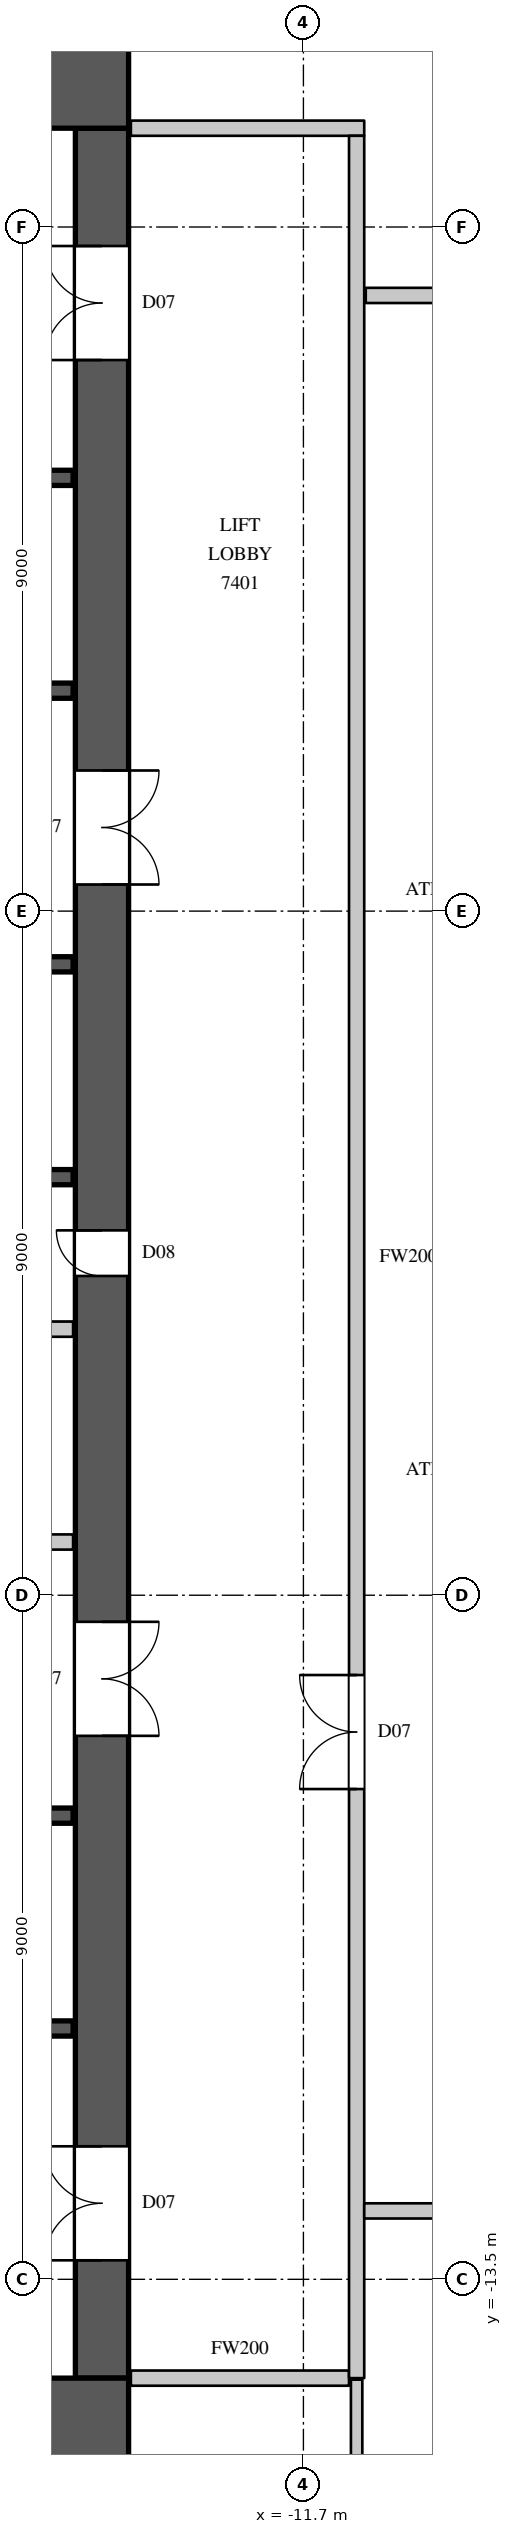
"""IFC4 building model, lengths in metres.
Left out: names, types, materials, properties, quantities, classifications, styles, units other than length and angle.
Written with IfcOpenShell. Run it as: python <this file> out.ifc"""

import sys

from ifc_helpers import new_model, si_unit, direction, frame, frame_2d, origin, place, context, subcontext, project, spatial, rectangle, extrude, element, fill, save


model = new_model("IFC4")
c1 = context("Model", 3, precision=1e-05, world=origin(), true_north=direction((0.0, 1.0)))
c2 = subcontext(c1, "Body", "Model", "MODEL_VIEW")
j1 = project(units=[si_unit("LENGTHUNIT", "METRE"), si_unit("PLANEANGLEUNIT", "RADIAN")], contexts=[c1])
p1 = place(None, origin())
s1 = spatial("IfcSite", under=j1, at=p1, CompositionType="ELEMENT")
p2 = place(p1, origin())
s2 = spatial("IfcBuilding", under=s1, at=p2, CompositionType="ELEMENT")
p3 = place(p2, frame((0.0, 0.0, 325.4)))
s3 = spatial("IfcBuildingStorey", under=s2, at=p3, CompositionType="ELEMENT", Elevation=325.4)
for number, where, z_axis, x_axis in (
    (1, (-30.0, 15.4, 0.0), (0.0, 0.0, 1.0), (1.0, 0.0, 0.0)),
    (2, (-30.0, -15.4, 0.0), (0.0, 0.0, 1.0), (1.0, 0.0, 0.0)),
):
    element("IfcWall", number, at=place(p3, frame(where, z_axis=z_axis, x_axis=x_axis)), inside=s3, PredefinedType="SHEAR", context=c2, shape_type="SweptSolid", body=[
        extrude(rectangle(XDim=16.0, YDim=1.2, at=frame_2d((8.0, 0.0))), origin(), (0.0, 0.0, 1.0), 4.1),
    ])
p4 = place(p3, frame((-14.35, -14.8, 0.0), z_axis=(0.0, 0.0, 1.0), x_axis=(0.0, 1.0, 0.0)))
e3 = element("IfcWall", 3, at=p4, inside=s3, PredefinedType="SHEAR", context=c2, shape_type="SweptSolid", body=[
    extrude(rectangle(XDim=29.6, YDim=0.7, at=frame_2d((14.8, 0.0))), origin(), (0.0, 0.0, 1.0), 4.1),
])
p5 = place(p4, frame((1.55, 0.0, 0.0)))
e4 = element("IfcOpeningElement", 4, at=p5, cuts=e3, PredefinedType="OPENING", context=c2, shape_type="SweptSolid", body=[
    extrude(rectangle(XDim=1.5, YDim=2.4, at=frame_2d((0.75, 1.2))), frame((0.0, 0.36, 0.0), z_axis=(0.0, -1.0, 0.0), x_axis=(1.0, 0.0, 0.0)), (0.0, 0.0, 1.0), 0.72),
])
p6 = place(p4, frame((26.55, 0.0, 0.0)))
e5 = element("IfcOpeningElement", 5, at=p6, cuts=e3, PredefinedType="OPENING", context=c2, shape_type="SweptSolid", body=[
    extrude(rectangle(XDim=1.5, YDim=2.4, at=frame_2d((0.75, 1.2))), frame((0.0, 0.36, 0.0), z_axis=(0.0, -1.0, 0.0), x_axis=(1.0, 0.0, 0.0)), (0.0, 0.0, 1.0), 0.72),
])
p7 = place(p4, frame((8.45, 0.0, 0.0)))
e6 = element("IfcOpeningElement", 6, at=p7, cuts=e3, PredefinedType="OPENING", context=c2, shape_type="SweptSolid", body=[
    extrude(rectangle(XDim=1.5, YDim=2.4, at=frame_2d((0.75, 1.2))), frame((0.0, 0.36, 0.0), z_axis=(0.0, -1.0, 0.0), x_axis=(1.0, 0.0, 0.0)), (0.0, 0.0, 1.0), 0.72),
])
p8 = place(p4, frame((19.65, 0.0, 0.0)))
e7 = element("IfcOpeningElement", 7, at=p8, cuts=e3, PredefinedType="OPENING", context=c2, shape_type="SweptSolid", body=[
    extrude(rectangle(XDim=1.5, YDim=2.4, at=frame_2d((0.75, 1.2))), frame((0.0, 0.36, 0.0), z_axis=(0.0, -1.0, 0.0), x_axis=(1.0, 0.0, 0.0)), (0.0, 0.0, 1.0), 0.72),
])
p9 = place(p4, frame((14.5, 0.0, 0.0)))
e8 = element("IfcOpeningElement", 8, at=p9, cuts=e3, PredefinedType="OPENING", context=c2, shape_type="SweptSolid", body=[
    extrude(rectangle(XDim=0.6, YDim=2.0, at=frame_2d((0.3, 1.0))), frame((0.0, 0.36, 0.0), z_axis=(0.0, -1.0, 0.0), x_axis=(1.0, 0.0, 0.0)), (0.0, 0.0, 1.0), 0.72),
])
p10 = place(p3, frame((-17.78, -3.8, 0.0), z_axis=(0.0, 0.0, 1.0), x_axis=(1.0, 0.0, 0.0)))
e9 = element("IfcWall", 9, at=p10, inside=s3, PredefinedType="PARTITIONING", context=c2, shape_type="SweptSolid", body=[
    extrude(rectangle(XDim=3.05, YDim=0.2, at=frame_2d((1.525, 0.0))), origin(), (0.0, 0.0, 1.0), 3.8),
])
p11 = place(p10, frame((1.05, 0.0, 0.0)))
e10 = element("IfcOpeningElement", 10, at=p11, cuts=e9, PredefinedType="OPENING", context=c2, shape_type="SweptSolid", body=[
    extrude(rectangle(XDim=0.9, YDim=2.2, at=frame_2d((0.45, 1.1))), frame((0.0, 0.11, 0.0), z_axis=(0.0, -1.0, 0.0), x_axis=(1.0, 0.0, 0.0)), (0.0, 0.0, 1.0), 0.22),
])
p12 = place(p3, frame((-13.97, -14.8, 0.0), z_axis=(0.0, 0.0, 1.0), x_axis=(1.0, 0.0, 0.0)))
e11 = element("IfcWall", 11, at=p12, inside=s3, PredefinedType="PARTITIONING", context=c2, shape_type="SweptSolid", body=[
    extrude(rectangle(XDim=2.87, YDim=0.2, at=frame_2d((1.435, 0.0))), origin(), (0.0, 0.0, 1.0), 3.8),
])
p13 = place(p3, frame((-13.97, 14.8, 0.0), z_axis=(0.0, 0.0, 1.0), x_axis=(1.0, 0.0, 0.0)))
e12 = element("IfcWall", 12, at=p13, inside=s3, PredefinedType="PARTITIONING", context=c2, shape_type="SweptSolid", body=[
    extrude(rectangle(XDim=3.07, YDim=0.2, at=frame_2d((1.535, 0.0))), origin(), (0.0, 0.0, 1.0), 3.8),
])
p14 = place(p3, frame((-11.0, -14.8, 0.0), z_axis=(0.0, 0.0, 1.0), x_axis=(0.0, 1.0, 0.0)))
e13 = element("IfcWall", 13, at=p14, inside=s3, PredefinedType="PARTITIONING", context=c2, shape_type="SweptSolid", body=[
    extrude(rectangle(XDim=29.5, YDim=0.2, at=frame_2d((14.75, 0.0))), origin(), (0.0, 0.0, 1.0), 3.8),
])
p15 = place(p14, frame((7.75, 0.0, 0.0)))
e14 = element("IfcOpeningElement", 14, at=p15, cuts=e13, PredefinedType="OPENING", context=c2, shape_type="SweptSolid", body=[
    extrude(rectangle(XDim=1.5, YDim=2.4, at=frame_2d((0.75, 1.2))), frame((0.0, 0.11, 0.0), z_axis=(0.0, -1.0, 0.0), x_axis=(1.0, 0.0, 0.0)), (0.0, 0.0, 1.0), 0.22),
])
p16 = place(p3, frame((-10.9, -12.6, 0.0), z_axis=(0.0, 0.0, 1.0), x_axis=(1.0, 0.0, 0.0)))
e15 = element("IfcWall", 15, at=p16, inside=s3, PredefinedType="PARTITIONING", context=c2, shape_type="SweptSolid", body=[
    extrude(rectangle(XDim=22.6, YDim=0.2, at=frame_2d((11.3, 0.0))), origin(), (0.0, 0.0, 1.0), 3.8),
])
p17 = place(p16, frame((14.1, 0.0, 0.0)))
e16 = element("IfcOpeningElement", 16, at=p17, cuts=e15, PredefinedType="OPENING", context=c2, shape_type="SweptSolid", body=[
    extrude(rectangle(XDim=0.9, YDim=2.2, at=frame_2d((0.45, 1.1))), frame((0.0, 0.11, 0.0), z_axis=(0.0, -1.0, 0.0), x_axis=(1.0, 0.0, 0.0)), (0.0, 0.0, 1.0), 0.22),
])
p18 = place(p16, frame((17.4, 0.0, 0.0)))
e17 = element("IfcOpeningElement", 17, at=p18, cuts=e15, PredefinedType="OPENING", context=c2, shape_type="SweptSolid", body=[
    extrude(rectangle(XDim=0.9, YDim=2.2, at=frame_2d((0.45, 1.1))), frame((0.0, 0.11, 0.0), z_axis=(0.0, -1.0, 0.0), x_axis=(1.0, 0.0, 0.0)), (0.0, 0.0, 1.0), 0.22),
])
p19 = place(p16, frame((20.25, 0.0, 0.0)))
e18 = element("IfcOpeningElement", 18, at=p19, cuts=e15, PredefinedType="OPENING", context=c2, shape_type="SweptSolid", body=[
    extrude(rectangle(XDim=0.9, YDim=2.2, at=frame_2d((0.45, 1.1))), frame((0.0, 0.11, 0.0), z_axis=(0.0, -1.0, 0.0), x_axis=(1.0, 0.0, 0.0)), (0.0, 0.0, 1.0), 0.22),
])
p20 = place(p16, frame((1.95, 0.0, 0.0)))
e19 = element("IfcOpeningElement", 19, at=p20, cuts=e15, PredefinedType="OPENING", context=c2, shape_type="SweptSolid", body=[
    extrude(rectangle(XDim=1.1, YDim=2.4, at=frame_2d((0.55, 1.2))), frame((0.0, 0.11, 0.0), z_axis=(0.0, -1.0, 0.0), x_axis=(1.0, 0.0, 0.0)), (0.0, 0.0, 1.0), 0.22),
])
p21 = place(p16, frame((9.95, 0.0, 0.0)))
e20 = element("IfcOpeningElement", 20, at=p21, cuts=e15, PredefinedType="OPENING", context=c2, shape_type="SweptSolid", body=[
    extrude(rectangle(XDim=1.1, YDim=2.4, at=frame_2d((0.55, 1.2))), frame((0.0, 0.11, 0.0), z_axis=(0.0, -1.0, 0.0), x_axis=(1.0, 0.0, 0.0)), (0.0, 0.0, 1.0), 0.22),
])
p22 = place(p3, frame((-10.88, 12.6, 0.0), z_axis=(0.0, 0.0, 1.0), x_axis=(1.0, 0.0, 0.0)))
e21 = element("IfcWall", 21, at=p22, inside=s3, PredefinedType="PARTITIONING", context=c2, shape_type="SweptSolid", body=[
    extrude(rectangle(XDim=4.08, YDim=0.2, at=frame_2d((2.04, 0.0))), origin(), (0.0, 0.0, 1.0), 3.8),
])
p23 = place(p3, frame((-11.0, -23.757, 0.0), z_axis=(0.0, 0.0, 1.0), x_axis=(0.0, 1.0, 0.0)))
e22 = element("IfcWall", 22, at=p23, inside=s3, PredefinedType="PARTITIONING", context=c2, shape_type="SweptSolid", body=[
    extrude(rectangle(XDim=8.937, YDim=0.15, at=frame_2d((4.468, 0.0))), origin(), (0.0, 0.0, 1.0), 3.8),
])
p24 = place(p3, frame((-29.27, -1.0, 0.0), z_axis=(0.0, 0.0, 1.0), x_axis=(1.0, 0.0, 0.0)))
e23 = element("IfcWall", 23, at=p24, inside=s3, PredefinedType="PARTITIONING", context=c2, shape_type="SweptSolid", body=[
    extrude(rectangle(XDim=14.54, YDim=0.2, at=frame_2d((7.27, 0.0))), origin(), (0.0, 0.0, 1.0), 3.8),
])
p25 = place(p3, frame((-17.92, -10.2, 0.0), z_axis=(0.0, 0.0, 1.0), x_axis=(1.0, 0.0, 0.0)))
e24 = element("IfcWall", 24, at=p25, inside=s3, PredefinedType="SHEAR", context=c2, shape_type="SweptSolid", body=[
    extrude(rectangle(XDim=3.19, YDim=0.2, at=frame_2d((1.595, 0.0))), origin(), (0.0, 0.0, 1.0), 3.8),
])
p26 = place(p25, frame((1.05, 0.0, 0.0)))
e25 = element("IfcOpeningElement", 25, at=p26, cuts=e24, PredefinedType="OPENING", context=c2, shape_type="SweptSolid", body=[
    extrude(rectangle(XDim=1.1, YDim=2.2, at=frame_2d((0.55, 1.1))), frame((0.0, 0.11, 0.0), z_axis=(0.0, -1.0, 0.0), x_axis=(1.0, 0.0, 0.0)), (0.0, 0.0, 1.0), 0.22),
])
for number, where, z_axis, x_axis in (
    (26, (-17.9, -7.4, 0.0), (0.0, 0.0, 1.0), (1.0, 0.0, 0.0)),
    (27, (-17.9, 1.0, 0.0), (0.0, 0.0, 1.0), (1.0, 0.0, 0.0)),
):
    element("IfcWall", number, at=place(p3, frame(where, z_axis=z_axis, x_axis=x_axis)), inside=s3, PredefinedType="SHEAR", context=c2, shape_type="SweptSolid", body=[
        extrude(rectangle(XDim=3.17, YDim=0.2, at=frame_2d((1.585, 0.0))), origin(), (0.0, 0.0, 1.0), 3.8),
    ])
p27 = place(p3, frame((-17.9, 3.8, 0.0), z_axis=(0.0, 0.0, 1.0), x_axis=(1.0, 0.0, 0.0)))
e28 = element("IfcWall", 28, at=p27, inside=s3, PredefinedType="SHEAR", context=c2, shape_type="SweptSolid", body=[
    extrude(rectangle(XDim=3.17, YDim=0.2, at=frame_2d((1.585, 0.0))), origin(), (0.0, 0.0, 1.0), 3.8),
])
p28 = place(p27, frame((1.05, 0.0, 0.0)))
e29 = element("IfcOpeningElement", 29, at=p28, cuts=e28, PredefinedType="OPENING", context=c2, shape_type="SweptSolid", body=[
    extrude(rectangle(XDim=1.1, YDim=2.2, at=frame_2d((0.55, 1.1))), frame((0.0, 0.11, 0.0), z_axis=(0.0, -1.0, 0.0), x_axis=(1.0, 0.0, 0.0)), (0.0, 0.0, 1.0), 0.22),
])
p29 = place(p3, frame((-17.92, 7.4, 0.0), z_axis=(0.0, 0.0, 1.0), x_axis=(1.0, 0.0, 0.0)))
e30 = element("IfcWall", 30, at=p29, inside=s3, PredefinedType="SHEAR", context=c2, shape_type="SweptSolid", body=[
    extrude(rectangle(XDim=3.19, YDim=0.2, at=frame_2d((1.595, 0.0))), origin(), (0.0, 0.0, 1.0), 3.8),
])
p30 = place(p3, frame((-17.92, 10.2, 0.0), z_axis=(0.0, 0.0, 1.0), x_axis=(1.0, 0.0, 0.0)))
e31 = element("IfcWall", 31, at=p30, inside=s3, PredefinedType="SHEAR", context=c2, shape_type="SweptSolid", body=[
    extrude(rectangle(XDim=3.19, YDim=0.2, at=frame_2d((1.595, 0.0))), origin(), (0.0, 0.0, 1.0), 3.8),
])
p31 = place(p30, frame((1.05, 0.0, 0.0)))
e32 = element("IfcOpeningElement", 32, at=p31, cuts=e31, PredefinedType="OPENING", context=c2, shape_type="SweptSolid", body=[
    extrude(rectangle(XDim=1.1, YDim=2.2, at=frame_2d((0.55, 1.1))), frame((0.0, 0.11, 0.0), z_axis=(0.0, -1.0, 0.0), x_axis=(1.0, 0.0, 0.0)), (0.0, 0.0, 1.0), 0.22),
])
p32 = place(p15, origin())
e33 = element("IfcDoor", 33, at=p32, inside=s3, OperationType="DOUBLE_DOOR_SINGLE_SWING", PredefinedType="DOOR", context=c2, shape_type="SweptSolid", body=[
    extrude(rectangle(XDim=1.5, YDim=2.4, at=frame_2d((0.75, 1.2))), frame((0.0, 0.025, 0.0), z_axis=(0.0, -1.0, 0.0), x_axis=(1.0, 0.0, 0.0)), (0.0, 0.0, 1.0), 0.05),
])
fill(e14, e33)
p33 = place(p5, origin())
e34 = element("IfcDoor", 34, at=p33, inside=s3, OperationType="DOUBLE_DOOR_SINGLE_SWING", PredefinedType="DOOR", context=c2, shape_type="SweptSolid", body=[
    extrude(rectangle(XDim=1.5, YDim=2.4, at=frame_2d((0.75, 1.2))), frame((0.0, 0.345, 0.0), z_axis=(0.0, -1.0, 0.0), x_axis=(1.0, 0.0, 0.0)), (0.0, 0.0, 1.0), 0.05),
])
fill(e4, e34)
p34 = place(p6, origin())
e35 = element("IfcDoor", 35, at=p34, inside=s3, OperationType="DOUBLE_DOOR_SINGLE_SWING", PredefinedType="DOOR", context=c2, shape_type="SweptSolid", body=[
    extrude(rectangle(XDim=1.5, YDim=2.4, at=frame_2d((0.75, 1.2))), frame((0.0, 0.345, 0.0), z_axis=(0.0, -1.0, 0.0), x_axis=(1.0, 0.0, 0.0)), (0.0, 0.0, 1.0), 0.05),
])
fill(e5, e35)
p35 = place(p7, origin())
e36 = element("IfcDoor", 36, at=p35, inside=s3, OperationType="DOUBLE_DOOR_SINGLE_SWING", PredefinedType="DOOR", context=c2, shape_type="SweptSolid", body=[
    extrude(rectangle(XDim=1.5, YDim=2.4, at=frame_2d((0.75, 1.2))), frame((0.0, -0.295, 0.0), z_axis=(0.0, -1.0, 0.0), x_axis=(1.0, 0.0, 0.0)), (0.0, 0.0, 1.0), 0.05),
])
fill(e6, e36)
p36 = place(p8, origin())
e37 = element("IfcDoor", 37, at=p36, inside=s3, OperationType="DOUBLE_DOOR_SINGLE_SWING", PredefinedType="DOOR", context=c2, shape_type="SweptSolid", body=[
    extrude(rectangle(XDim=1.5, YDim=2.4, at=frame_2d((0.75, 1.2))), frame((0.0, -0.295, 0.0), z_axis=(0.0, -1.0, 0.0), x_axis=(1.0, 0.0, 0.0)), (0.0, 0.0, 1.0), 0.05),
])
fill(e7, e37)
p37 = place(p9, origin())
e38 = element("IfcDoor", 38, at=p37, inside=s3, OperationType="SINGLE_SWING_RIGHT", PredefinedType="DOOR", context=c2, shape_type="SweptSolid", body=[
    extrude(rectangle(XDim=0.6, YDim=2.0, at=frame_2d((0.3, 1.0))), frame((0.0, 0.345, 0.0), z_axis=(0.0, -1.0, 0.0), x_axis=(1.0, 0.0, 0.0)), (0.0, 0.0, 1.0), 0.05),
])
fill(e8, e38)
save(model, sys.argv[1])
